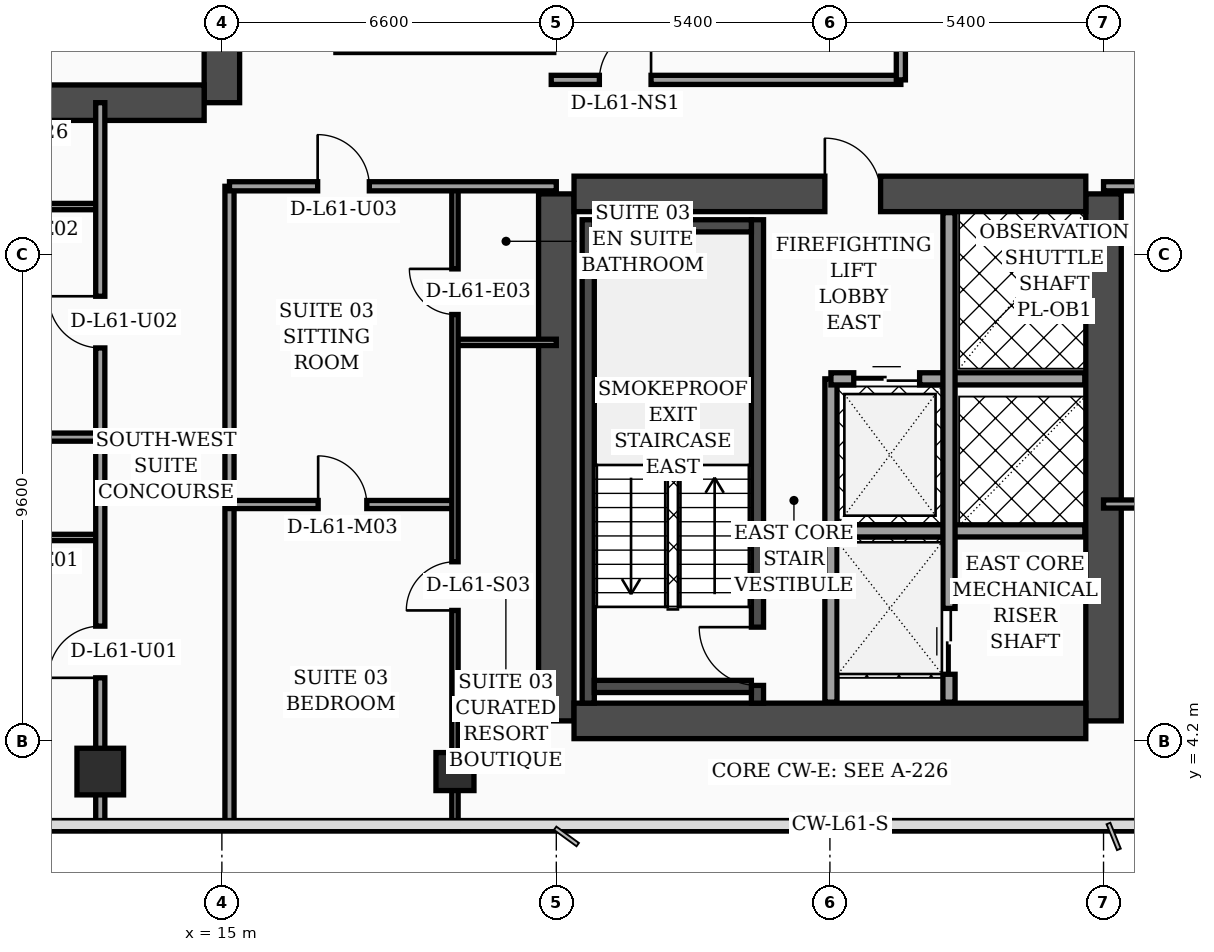
"""IFC4 building model, lengths in metres.
Left out: names, types, materials, properties, quantities, classifications, styles, units other than length and angle.
Written with IfcOpenShell. Run it as: python <this file> out.ifc"""

import sys

from ifc_helpers import new_model, si_unit, direction, frame, frame_2d, origin, origin_2d, place, context, subcontext, project, spatial, rectangle, hollow_rectangle, extrude, element, fill, save


model = new_model("IFC4")
c1 = context("Model", 3, precision=1e-05, world=origin(), true_north=direction((0.0, 1.0)))
c2 = subcontext(c1, "Body", "Model", "MODEL_VIEW")
j1 = project(units=[si_unit("LENGTHUNIT", "METRE"), si_unit("PLANEANGLEUNIT", "RADIAN")], contexts=[c1])
p1 = place(None, origin())
s1 = spatial("IfcSite", under=j1, at=p1, CompositionType="ELEMENT")
p2 = place(p1, origin())
s2 = spatial("IfcBuilding", under=s1, at=p2, CompositionType="ELEMENT")
p3 = place(p2, frame((0.0, 0.0, 247.6)))
s3 = spatial("IfcBuildingStorey", under=s2, at=p3, CompositionType="ELEMENT", Elevation=247.6)
p4 = place(p3, frame((15.0, 16.8, 0.0), z_axis=(0.0, 0.0, 1.0), x_axis=(0.0, 1.0, 0.0)))
e1 = element("IfcWall", 1, at=p4, inside=s3, PredefinedType="SHEAR", context=c2, shape_type="SweptSolid", body=[
    extrude(rectangle(XDim=21.6, YDim=0.7, at=frame_2d((10.8, 0.0))), origin(), (0.0, 0.0, 1.0), 3.56),
])
p5 = place(p4, frame((8.65, 0.0, 0.0)))
e2 = element("IfcOpeningElement", 2, at=p5, cuts=e1, PredefinedType="OPENING", context=c2, shape_type="SweptSolid", body=[
    extrude(rectangle(XDim=1.1, YDim=2.2, at=frame_2d((0.55, 1.1))), frame((0.0, 0.36, 0.0), z_axis=(0.0, -1.0, 0.0), x_axis=(1.0, 0.0, 0.0)), (0.0, 0.0, 1.0), 0.72),
])
p6 = place(p4, frame((18.9, 0.0, 0.0)))
e3 = element("IfcOpeningElement", 3, at=p6, cuts=e1, PredefinedType="OPENING", context=c2, shape_type="SweptSolid", body=[
    extrude(rectangle(XDim=1.1, YDim=2.2, at=frame_2d((0.55, 1.1))), frame((0.0, 0.36, 0.0), z_axis=(0.0, -1.0, 0.0), x_axis=(1.0, 0.0, 0.0)), (0.0, 0.0, 1.0), 0.72),
])
p7 = place(p3, frame((4.55, 16.8, 0.0), z_axis=(0.0, 0.0, 1.0), x_axis=(1.0, 0.0, 0.0)))
e4 = element("IfcWall", 4, at=p7, inside=s3, PredefinedType="SHEAR", context=c2, shape_type="SweptSolid", body=[
    extrude(rectangle(XDim=10.1, YDim=0.7, at=frame_2d((5.05, 0.0))), origin(), (0.0, 0.0, 1.0), 3.56),
])
for number, where, z_axis, x_axis in (
    (5, (21.6, 4.6, 0.0), (0.0, 0.0, 1.0), (0.0, 1.0, 0.0)),
    (6, (32.4, 4.6, 0.0), (0.0, 0.0, 1.0), (0.0, 1.0, 0.0)),
):
    element("IfcWall", number, at=place(p3, frame(where, z_axis=z_axis, x_axis=x_axis)), inside=s3, PredefinedType="SHEAR", context=c2, shape_type="SweptSolid", body=[
        extrude(rectangle(XDim=10.4, YDim=0.7, at=frame_2d((5.2, 0.0))), origin(), (0.0, 0.0, 1.0), 3.56),
    ])
p8 = place(p3, frame((21.95, 15.0, 0.0), z_axis=(0.0, 0.0, 1.0), x_axis=(1.0, 0.0, 0.0)))
e7 = element("IfcWall", 7, at=p8, inside=s3, PredefinedType="SHEAR", context=c2, shape_type="SweptSolid", body=[
    extrude(rectangle(XDim=10.1, YDim=0.7, at=frame_2d((5.05, 0.0))), origin(), (0.0, 0.0, 1.0), 3.56),
])
p9 = place(p8, frame((4.95, 0.0, 0.0)))
e8 = element("IfcOpeningElement", 8, at=p9, cuts=e7, PredefinedType="OPENING", context=c2, shape_type="SweptSolid", body=[
    extrude(rectangle(XDim=1.1, YDim=2.2, at=frame_2d((0.55, 1.1))), frame((0.0, 0.36, 0.0), z_axis=(0.0, -1.0, 0.0), x_axis=(1.0, 0.0, 0.0)), (0.0, 0.0, 1.0), 0.72),
])
p10 = place(p3, frame((21.95, 4.6, 0.0), z_axis=(0.0, 0.0, 1.0), x_axis=(1.0, 0.0, 0.0)))
e9 = element("IfcWall", 9, at=p10, inside=s3, PredefinedType="SHEAR", context=c2, shape_type="SweptSolid", body=[
    extrude(rectangle(XDim=10.1, YDim=0.7, at=frame_2d((5.05, 0.0))), origin(), (0.0, 0.0, 1.0), 3.56),
])
p11 = place(p3, frame((22.23, 4.95, 0.0), z_axis=(0.0, 0.0, 1.0), x_axis=(0.0, 1.0, 0.0)))
e10 = element("IfcWall", 10, at=p11, inside=s3, PredefinedType="SOLIDWALL", context=c2, shape_type="SweptSolid", body=[
    extrude(rectangle(XDim=9.54, YDim=0.24, at=frame_2d((4.77, 0.0))), origin(), (0.0, 0.0, 1.0), 3.56),
])
p12 = place(p3, frame((25.57, 4.95, 0.0), z_axis=(0.0, 0.0, 1.0), x_axis=(0.0, 1.0, 0.0)))
e11 = element("IfcWall", 11, at=p12, inside=s3, PredefinedType="SOLIDWALL", context=c2, shape_type="SweptSolid", body=[
    extrude(rectangle(XDim=9.54, YDim=0.24, at=frame_2d((4.77, 0.0))), origin(), (0.0, 0.0, 1.0), 3.56),
])
p13 = place(p12, frame((0.35, 0.0, 0.0)))
e12 = element("IfcOpeningElement", 12, at=p13, cuts=e11, PredefinedType="OPENING", context=c2, shape_type="SweptSolid", body=[
    extrude(rectangle(XDim=1.15, YDim=2.2, at=frame_2d((0.575, 1.1))), frame((0.0, 0.13, 0.0), z_axis=(0.0, -1.0, 0.0), x_axis=(1.0, 0.0, 0.0)), (0.0, 0.0, 1.0), 0.26),
])
for number, where, z_axis, x_axis in (
    (13, (22.35, 5.28, 0.0), (0.0, 0.0, 1.0), (1.0, 0.0, 0.0)),
    (14, (22.35, 14.37, 0.0), (0.0, 0.0, 1.0), (1.0, 0.0, 0.0)),
):
    element("IfcWall", number, at=place(p3, frame(where, z_axis=z_axis, x_axis=x_axis)), inside=s3, PredefinedType="SOLIDWALL", context=c2, shape_type="SweptSolid", body=[
        extrude(rectangle(XDim=3.1, YDim=0.24, at=frame_2d((1.55, 0.0))), origin(), (0.0, 0.0, 1.0), 3.56),
    ])
p14 = place(p3, frame((12.6, 3.6, 0.0), z_axis=(0.0, 0.0, 1.0), x_axis=(1.0, 0.0, 0.0)))
e15 = element("IfcColumn", 15, at=p14, inside=s3, PredefinedType="COLUMN", context=c2, shape_type="SweptSolid", body=[
    extrude(rectangle(XDim=0.92, YDim=0.92, at=origin_2d()), origin(), (0.0, 0.0, 1.0), 3.56),
])
p15 = place(p3, frame((19.6, 3.6, 0.0), z_axis=(0.0, 0.0, 1.0), x_axis=(1.0, 0.0, 0.0)))
e16 = element("IfcColumn", 16, at=p15, inside=s3, PredefinedType="COLUMN", context=c2, shape_type="SweptSolid", body=[
    extrude(hollow_rectangle(XDim=0.75, YDim=0.75, WallThickness=0.032, at=origin_2d()), origin(), (0.0, 0.0, 1.0), 3.56),
])
p16 = place(p3, frame((27.02, 4.97, 0.0), z_axis=(0.0, 0.0, 1.0), x_axis=(0.0, 1.0, 0.0)))
e17 = element("IfcWall", 17, at=p16, inside=s3, PredefinedType="SOLIDWALL", context=c2, shape_type="SweptSolid", body=[
    extrude(rectangle(XDim=6.38, YDim=0.24, at=frame_2d((3.19, 0.0))), origin(), (0.0, 0.0, 1.0), 3.56),
])
p17 = place(p3, frame((27.02, 11.35, 0.0), z_axis=(0.0, 0.0, 1.0), x_axis=(1.0, 0.0, 0.0)))
e18 = element("IfcWall", 18, at=p17, inside=s3, PredefinedType="SOLIDWALL", context=c2, shape_type="SweptSolid", body=[
    extrude(rectangle(XDim=5.01, YDim=0.24, at=frame_2d((2.505, 0.0))), origin(), (0.0, 0.0, 1.0), 3.56),
])
p18 = place(p17, frame((0.45, 0.0, 0.0)))
e19 = element("IfcOpeningElement", 19, at=p18, cuts=e18, PredefinedType="OPENING", context=c2, shape_type="SweptSolid", body=[
    extrude(rectangle(XDim=1.3, YDim=2.35, at=frame_2d((0.65, 1.175))), frame((0.0, 0.13, 0.0), z_axis=(0.0, -1.0, 0.0), x_axis=(1.0, 0.0, 0.0)), (0.0, 0.0, 1.0), 0.26),
])
p19 = place(p3, frame((27.02, 8.35, 0.0), z_axis=(0.0, 0.0, 1.0), x_axis=(1.0, 0.0, 0.0)))
e20 = element("IfcWall", 20, at=p19, inside=s3, PredefinedType="SOLIDWALL", context=c2, shape_type="SweptSolid", body=[
    extrude(rectangle(XDim=5.01, YDim=0.24, at=frame_2d((2.505, 0.0))), origin(), (0.0, 0.0, 1.0), 3.56),
])
p20 = place(p3, frame((29.35, 4.97, 0.0), z_axis=(0.0, 0.0, 1.0), x_axis=(0.0, 1.0, 0.0)))
e21 = element("IfcWall", 21, at=p20, inside=s3, PredefinedType="SOLIDWALL", context=c2, shape_type="SweptSolid", body=[
    extrude(rectangle(XDim=9.66, YDim=0.24, at=frame_2d((4.83, 0.0))), origin(), (0.0, 0.0, 1.0), 3.56),
])
p21 = place(p20, frame((0.55, 0.0, 0.0)))
e22 = element("IfcOpeningElement", 22, at=p21, cuts=e21, PredefinedType="OPENING", context=c2, shape_type="SweptSolid", body=[
    extrude(rectangle(XDim=1.3, YDim=2.35, at=frame_2d((0.65, 1.175))), frame((0.0, 0.13, 0.0), z_axis=(0.0, -1.0, 0.0), x_axis=(1.0, 0.0, 0.0)), (0.0, 0.0, 1.0), 0.26),
])
p22 = place(p3, frame((3.2, 8.22, 0.0), z_axis=(0.0, 0.0, 1.0), x_axis=(1.0, 0.0, 0.0)))
e23 = element("IfcWall", 23, at=p22, inside=s3, PredefinedType="PARTITIONING", context=c2, shape_type="SweptSolid", body=[
    extrude(rectangle(XDim=9.4, YDim=0.125, at=frame_2d((4.7, 0.0))), origin(), (0.0, 0.0, 1.0), 2.99),
])
p23 = place(p22, frame((3.3, 0.0, 0.0)))
e24 = element("IfcOpeningElement", 24, at=p23, cuts=e23, PredefinedType="OPENING", context=c2, shape_type="SweptSolid", body=[
    extrude(rectangle(XDim=0.96, YDim=2.2, at=frame_2d((0.48, 1.1))), frame((0.0, 0.073, 0.0), z_axis=(0.0, -1.0, 0.0), x_axis=(1.0, 0.0, 0.0)), (0.0, 0.0, 1.0), 0.145),
])
p24 = place(p22, frame((7.49, 0.0, 0.0)))
e25 = element("IfcOpeningElement", 25, at=p24, cuts=e23, PredefinedType="OPENING", context=c2, shape_type="SweptSolid", body=[
    extrude(rectangle(XDim=0.9, YDim=2.15, at=frame_2d((0.45, 1.075))), frame((0.0, 0.073, 0.0), z_axis=(0.0, -1.0, 0.0), x_axis=(1.0, 0.0, 0.0)), (0.0, 0.0, 1.0), 0.145),
])
p25 = place(p3, frame((0.08, 14.75, 0.0), z_axis=(0.0, 0.0, 1.0), x_axis=(1.0, 0.0, 0.0)))
e26 = element("IfcWall", 26, at=p25, inside=s3, PredefinedType="PARTITIONING", context=c2, shape_type="SweptSolid", body=[
    extrude(rectangle(XDim=12.52, YDim=0.125, at=frame_2d((6.26, 0.0))), origin(), (0.0, 0.0, 1.0), 2.99),
])
p26 = place(p25, frame((4.32, 0.0, 0.0)))
e27 = element("IfcOpeningElement", 27, at=p26, cuts=e26, PredefinedType="OPENING", context=c2, shape_type="SweptSolid", body=[
    extrude(rectangle(XDim=0.96, YDim=2.2, at=frame_2d((0.48, 1.1))), frame((0.0, 0.073, 0.0), z_axis=(0.0, -1.0, 0.0), x_axis=(1.0, 0.0, 0.0)), (0.0, 0.0, 1.0), 0.145),
])
p27 = place(p25, frame((10.61, 0.0, 0.0)))
e28 = element("IfcOpeningElement", 28, at=p27, cuts=e26, PredefinedType="OPENING", context=c2, shape_type="SweptSolid", body=[
    extrude(rectangle(XDim=0.9, YDim=2.15, at=frame_2d((0.45, 1.075))), frame((0.0, 0.073, 0.0), z_axis=(0.0, -1.0, 0.0), x_axis=(1.0, 0.0, 0.0)), (0.0, 0.0, 1.0), 0.145),
])
p28 = place(p3, frame((0.08, 10.2, 0.0), z_axis=(0.0, 0.0, 1.0), x_axis=(1.0, 0.0, 0.0)))
e29 = element("IfcWall", 29, at=p28, inside=s3, PredefinedType="PARTITIONING", context=c2, shape_type="SweptSolid", body=[
    extrude(rectangle(XDim=12.52, YDim=0.16, at=frame_2d((6.26, 0.0))), origin(), (0.0, 0.0, 1.0), 2.99),
])
p29 = place(p3, frame((12.6, 2.44, 0.0), z_axis=(0.0, 0.0, 1.0), x_axis=(0.0, 1.0, 0.0)))
e30 = element("IfcWall", 30, at=p29, inside=s3, PredefinedType="PARTITIONING", context=c2, shape_type="SweptSolid", body=[
    extrude(rectangle(XDim=14.36, YDim=0.18, at=frame_2d((7.18, 0.0))), origin(), (0.0, 0.0, 1.0), 2.99),
])
p30 = place(p29, frame((3.01, 0.0, 0.0)))
e31 = element("IfcOpeningElement", 31, at=p30, cuts=e30, PredefinedType="OPENING", context=c2, shape_type="SweptSolid", body=[
    extrude(rectangle(XDim=1.02, YDim=2.2, at=frame_2d((0.51, 1.1))), frame((0.0, 0.1, 0.0), z_axis=(0.0, -1.0, 0.0), x_axis=(1.0, 0.0, 0.0)), (0.0, 0.0, 1.0), 0.2),
])
p31 = place(p29, frame((9.52, 0.0, 0.0)))
e32 = element("IfcOpeningElement", 32, at=p31, cuts=e30, PredefinedType="OPENING", context=c2, shape_type="SweptSolid", body=[
    extrude(rectangle(XDim=1.02, YDim=2.2, at=frame_2d((0.51, 1.1))), frame((0.0, 0.1, 0.0), z_axis=(0.0, -1.0, 0.0), x_axis=(1.0, 0.0, 0.0)), (0.0, 0.0, 1.0), 0.2),
])
p32 = place(p3, frame((15.15, 2.44, 0.0), z_axis=(0.0, 0.0, 1.0), x_axis=(0.0, 1.0, 0.0)))
e33 = element("IfcWall", 33, at=p32, inside=s3, PredefinedType="PARTITIONING", context=c2, shape_type="SweptSolid", body=[
    extrude(rectangle(XDim=12.71, YDim=0.18, at=frame_2d((6.355, 0.0))), origin(), (0.0, 0.0, 1.0), 3.09),
])
p33 = place(p3, frame((19.6, 12.07, 0.0), z_axis=(0.0, 0.0, 1.0), x_axis=(1.0, 0.0, 0.0)))
e34 = element("IfcWall", 34, at=p33, inside=s3, PredefinedType="PARTITIONING", context=c2, shape_type="SweptSolid", body=[
    extrude(rectangle(XDim=2.0, YDim=0.125, at=frame_2d((1.0, 0.0))), origin(), (0.0, 0.0, 1.0), 3.56),
])
p34 = place(p3, frame((15.15, 8.87, 0.0), z_axis=(0.0, 0.0, 1.0), x_axis=(1.0, 0.0, 0.0)))
e35 = element("IfcWall", 35, at=p34, inside=s3, PredefinedType="PARTITIONING", context=c2, shape_type="SweptSolid", body=[
    extrude(rectangle(XDim=4.45, YDim=0.16, at=frame_2d((2.225, 0.0))), origin(), (0.0, 0.0, 1.0), 3.56),
])
p35 = place(p34, frame((1.75, 0.0, 0.0)))
e36 = element("IfcOpeningElement", 36, at=p35, cuts=e35, PredefinedType="OPENING", context=c2, shape_type="SweptSolid", body=[
    extrude(rectangle(XDim=0.96, YDim=2.2, at=frame_2d((0.48, 1.1))), frame((0.0, 0.09, 0.0), z_axis=(0.0, -1.0, 0.0), x_axis=(1.0, 0.0, 0.0)), (0.0, 0.0, 1.0), 0.18),
])
p36 = place(p3, frame((19.6, 2.44, 0.0), z_axis=(0.0, 0.0, 1.0), x_axis=(0.0, 1.0, 0.0)))
e37 = element("IfcWall", 37, at=p36, inside=s3, PredefinedType="PARTITIONING", context=c2, shape_type="SweptSolid", body=[
    extrude(rectangle(XDim=12.71, YDim=0.125, at=frame_2d((6.355, 0.0))), origin(), (0.0, 0.0, 1.0), 2.59),
])
p37 = place(p36, frame((4.34, 0.0, 0.0)))
e38 = element("IfcOpeningElement", 38, at=p37, cuts=e37, PredefinedType="OPENING", context=c2, shape_type="SweptSolid", body=[
    extrude(rectangle(XDim=0.96, YDim=2.2, at=frame_2d((0.48, 1.1))), frame((0.0, 0.073, 0.0), z_axis=(0.0, -1.0, 0.0), x_axis=(1.0, 0.0, 0.0)), (0.0, 0.0, 1.0), 0.145),
])
p38 = place(p36, frame((10.18, 0.0, 0.0)))
e39 = element("IfcOpeningElement", 39, at=p38, cuts=e37, PredefinedType="OPENING", context=c2, shape_type="SweptSolid", body=[
    extrude(rectangle(XDim=0.9, YDim=2.15, at=frame_2d((0.45, 1.075))), frame((0.0, 0.073, 0.0), z_axis=(0.0, -1.0, 0.0), x_axis=(1.0, 0.0, 0.0)), (0.0, 0.0, 1.0), 0.145),
])
p39 = place(p3, frame((15.15, 15.15, 0.0), z_axis=(0.0, 0.0, 1.0), x_axis=(1.0, 0.0, 0.0)))
e40 = element("IfcWall", 40, at=p39, inside=s3, PredefinedType="PARTITIONING", context=c2, shape_type="SweptSolid", body=[
    extrude(rectangle(XDim=6.45, YDim=0.18, at=frame_2d((3.225, 0.0))), origin(), (0.0, 0.0, 1.0), 2.59),
])
p40 = place(p39, frame((1.74, 0.0, 0.0)))
e41 = element("IfcOpeningElement", 41, at=p40, cuts=e40, PredefinedType="OPENING", context=c2, shape_type="SweptSolid", body=[
    extrude(rectangle(XDim=1.02, YDim=2.2, at=frame_2d((0.51, 1.1))), frame((0.0, 0.1, 0.0), z_axis=(0.0, -1.0, 0.0), x_axis=(1.0, 0.0, 0.0)), (0.0, 0.0, 1.0), 0.2),
])
p41 = place(p3, frame((17.25, 17.88, 0.0), z_axis=(0.0, 0.0, 1.0), x_axis=(1.0, 0.0, 0.0)))
e42 = element("IfcWall", 42, at=p41, inside=s3, PredefinedType="PARTITIONING", context=c2, shape_type="SweptSolid", body=[
    extrude(rectangle(XDim=4.3, YDim=0.18, at=frame_2d((2.15, 0.0))), origin(), (0.0, 0.0, 1.0), 3.09),
])
p42 = place(p3, frame((32.4, 8.88, 0.0), z_axis=(0.0, 0.0, 1.0), x_axis=(1.0, 0.0, 0.0)))
e43 = element("IfcWall", 43, at=p42, inside=s3, PredefinedType="PARTITIONING", context=c2, shape_type="SweptSolid", body=[
    extrude(rectangle(XDim=5.49, YDim=0.16, at=frame_2d((2.745, 0.0))), origin(), (0.0, 0.0, 1.0), 2.99),
])
p43 = place(p42, frame((2.27, 0.0, 0.0)))
e44 = element("IfcOpeningElement", 44, at=p43, cuts=e43, PredefinedType="OPENING", context=c2, shape_type="SweptSolid", body=[
    extrude(rectangle(XDim=0.96, YDim=2.2, at=frame_2d((0.48, 1.1))), frame((0.0, 0.09, 0.0), z_axis=(0.0, -1.0, 0.0), x_axis=(1.0, 0.0, 0.0)), (0.0, 0.0, 1.0), 0.18),
])
p44 = place(p3, frame((32.4, 15.15, 0.0), z_axis=(0.0, 0.0, 1.0), x_axis=(1.0, 0.0, 0.0)))
e45 = element("IfcWall", 45, at=p44, inside=s3, PredefinedType="PARTITIONING", context=c2, shape_type="SweptSolid", body=[
    extrude(rectangle(XDim=7.6, YDim=0.18, at=frame_2d((3.8, 0.0))), origin(), (0.0, 0.0, 1.0), 2.99),
])
p45 = place(p44, frame((2.33, 0.0, 0.0)))
e46 = element("IfcOpeningElement", 46, at=p45, cuts=e45, PredefinedType="OPENING", context=c2, shape_type="SweptSolid", body=[
    extrude(rectangle(XDim=1.02, YDim=2.2, at=frame_2d((0.51, 1.1))), frame((0.0, 0.1, 0.0), z_axis=(0.0, -1.0, 0.0), x_axis=(1.0, 0.0, 0.0)), (0.0, 0.0, 1.0), 0.2),
])
p46 = place(p3, frame((21.5, 17.25, 0.0), z_axis=(0.0, 0.0, 1.0), x_axis=(1.0, 0.0, 0.0)))
e47 = element("IfcWall", 47, at=p46, inside=s3, PredefinedType="PARTITIONING", context=c2, shape_type="SweptSolid", body=[
    extrude(rectangle(XDim=6.9, YDim=0.18, at=frame_2d((3.45, 0.0))), origin(), (0.0, 0.0, 1.0), 2.99),
])
p47 = place(p46, frame((0.95, 0.0, 0.0)))
e48 = element("IfcOpeningElement", 48, at=p47, cuts=e47, PredefinedType="OPENING", context=c2, shape_type="SweptSolid", body=[
    extrude(rectangle(XDim=1.02, YDim=2.2, at=frame_2d((0.51, 1.1))), frame((0.0, 0.1, 0.0), z_axis=(0.0, -1.0, 0.0), x_axis=(1.0, 0.0, 0.0)), (0.0, 0.0, 1.0), 0.2),
])
p48 = place(p3, frame((28.4, 17.25, 0.0), z_axis=(0.0, 0.0, 1.0), x_axis=(0.0, 1.0, 0.0)))
e49 = element("IfcWall", 49, at=p48, inside=s3, PredefinedType="PARTITIONING", context=c2, shape_type="SweptSolid", body=[
    extrude(rectangle(XDim=15.07, YDim=0.18, at=frame_2d((7.535, 0.0))), origin(), (0.0, 0.0, 1.0), 2.99),
])
p49 = place(p18, origin())
e50 = element("IfcDoor", 50, at=p49, inside=s3, OperationType="DOUBLE_DOOR_SLIDING", PredefinedType="DOOR", context=c2, shape_type="SweptSolid", body=[
    extrude(rectangle(XDim=1.3, YDim=2.35, at=frame_2d((0.65, 1.175))), frame((0.0, 0.025, 0.0), z_axis=(0.0, -1.0, 0.0), x_axis=(1.0, 0.0, 0.0)), (0.0, 0.0, 1.0), 0.05),
])
fill(e19, e50)
p50 = place(p21, origin())
e51 = element("IfcDoor", 51, at=p50, inside=s3, OperationType="DOUBLE_DOOR_SLIDING", PredefinedType="DOOR", context=c2, shape_type="SweptSolid", body=[
    extrude(rectangle(XDim=1.3, YDim=2.35, at=frame_2d((0.65, 1.175))), frame((0.0, 0.025, 0.0), z_axis=(0.0, -1.0, 0.0), x_axis=(1.0, 0.0, 0.0)), (0.0, 0.0, 1.0), 0.05),
])
fill(e22, e51)
p51 = place(p30, origin())
e52 = element("IfcDoor", 52, at=p51, inside=s3, OperationType="SINGLE_SWING_LEFT", PredefinedType="DOOR", context=c2, shape_type="SweptSolid", body=[
    extrude(rectangle(XDim=1.02, YDim=2.2, at=frame_2d((0.51, 1.1))), frame((0.0, 0.025, 0.0), z_axis=(0.0, -1.0, 0.0), x_axis=(1.0, 0.0, 0.0)), (0.0, 0.0, 1.0), 0.05),
])
fill(e31, e52)
p52 = place(p31, origin())
e53 = element("IfcDoor", 53, at=p52, inside=s3, OperationType="SINGLE_SWING_RIGHT", PredefinedType="DOOR", context=c2, shape_type="SweptSolid", body=[
    extrude(rectangle(XDim=1.02, YDim=2.2, at=frame_2d((0.51, 1.1))), frame((0.0, 0.025, 0.0), z_axis=(0.0, -1.0, 0.0), x_axis=(1.0, 0.0, 0.0)), (0.0, 0.0, 1.0), 0.05),
])
fill(e32, e53)
p53 = place(p35, origin())
e54 = element("IfcDoor", 54, at=p53, inside=s3, OperationType="SINGLE_SWING_LEFT", PredefinedType="DOOR", context=c2, shape_type="SweptSolid", body=[
    extrude(rectangle(XDim=0.96, YDim=2.2, at=frame_2d((0.48, 1.1))), frame((0.0, 0.025, 0.0), z_axis=(0.0, -1.0, 0.0), x_axis=(1.0, 0.0, 0.0)), (0.0, 0.0, 1.0), 0.05),
])
fill(e36, e54)
p54 = place(p37, origin())
e55 = element("IfcDoor", 55, at=p54, inside=s3, OperationType="SINGLE_SWING_LEFT", PredefinedType="DOOR", context=c2, shape_type="SweptSolid", body=[
    extrude(rectangle(XDim=0.96, YDim=2.2, at=frame_2d((0.48, 1.1))), frame((0.0, 0.025, 0.0), z_axis=(0.0, -1.0, 0.0), x_axis=(1.0, 0.0, 0.0)), (0.0, 0.0, 1.0), 0.05),
])
fill(e38, e55)
p55 = place(p38, origin())
e56 = element("IfcDoor", 56, at=p55, inside=s3, OperationType="SINGLE_SWING_RIGHT", PredefinedType="DOOR", context=c2, shape_type="SweptSolid", body=[
    extrude(rectangle(XDim=0.9, YDim=2.15, at=frame_2d((0.45, 1.075))), frame((0.0, 0.025, 0.0), z_axis=(0.0, -1.0, 0.0), x_axis=(1.0, 0.0, 0.0)), (0.0, 0.0, 1.0), 0.05),
])
fill(e39, e56)
p56 = place(p40, origin())
e57 = element("IfcDoor", 57, at=p56, inside=s3, OperationType="SINGLE_SWING_LEFT", PredefinedType="DOOR", context=c2, shape_type="SweptSolid", body=[
    extrude(rectangle(XDim=1.02, YDim=2.2, at=frame_2d((0.51, 1.1))), frame((0.0, 0.025, 0.0), z_axis=(0.0, -1.0, 0.0), x_axis=(1.0, 0.0, 0.0)), (0.0, 0.0, 1.0), 0.05),
])
fill(e41, e57)
p57 = place(p47, origin())
e58 = element("IfcDoor", 58, at=p57, inside=s3, OperationType="SINGLE_SWING_RIGHT", PredefinedType="DOOR", context=c2, shape_type="SweptSolid", body=[
    extrude(rectangle(XDim=1.02, YDim=2.2, at=frame_2d((0.51, 1.1))), frame((0.0, 0.025, 0.0), z_axis=(0.0, -1.0, 0.0), x_axis=(1.0, 0.0, 0.0)), (0.0, 0.0, 1.0), 0.05),
])
fill(e48, e58)
p58 = place(p13, origin())
e59 = element("IfcDoor", 59, at=p58, inside=s3, OperationType="SINGLE_SWING_RIGHT", PredefinedType="DOOR", context=c2, shape_type="SweptSolid", body=[
    extrude(rectangle(XDim=1.15, YDim=2.2, at=frame_2d((0.575, 1.1))), frame((0.0, 0.025, 0.0), z_axis=(0.0, -1.0, 0.0), x_axis=(1.0, 0.0, 0.0)), (0.0, 0.0, 1.0), 0.05),
])
fill(e12, e59)
p59 = place(p9, origin())
e60 = element("IfcDoor", 60, at=p59, inside=s3, OperationType="SINGLE_SWING_LEFT", PredefinedType="DOOR", context=c2, shape_type="SweptSolid", body=[
    extrude(rectangle(XDim=1.1, YDim=2.2, at=frame_2d((0.55, 1.1))), frame((0.0, 0.025, 0.0), z_axis=(0.0, -1.0, 0.0), x_axis=(1.0, 0.0, 0.0)), (0.0, 0.0, 1.0), 0.05),
])
fill(e8, e60)
save(model, sys.argv[1])
